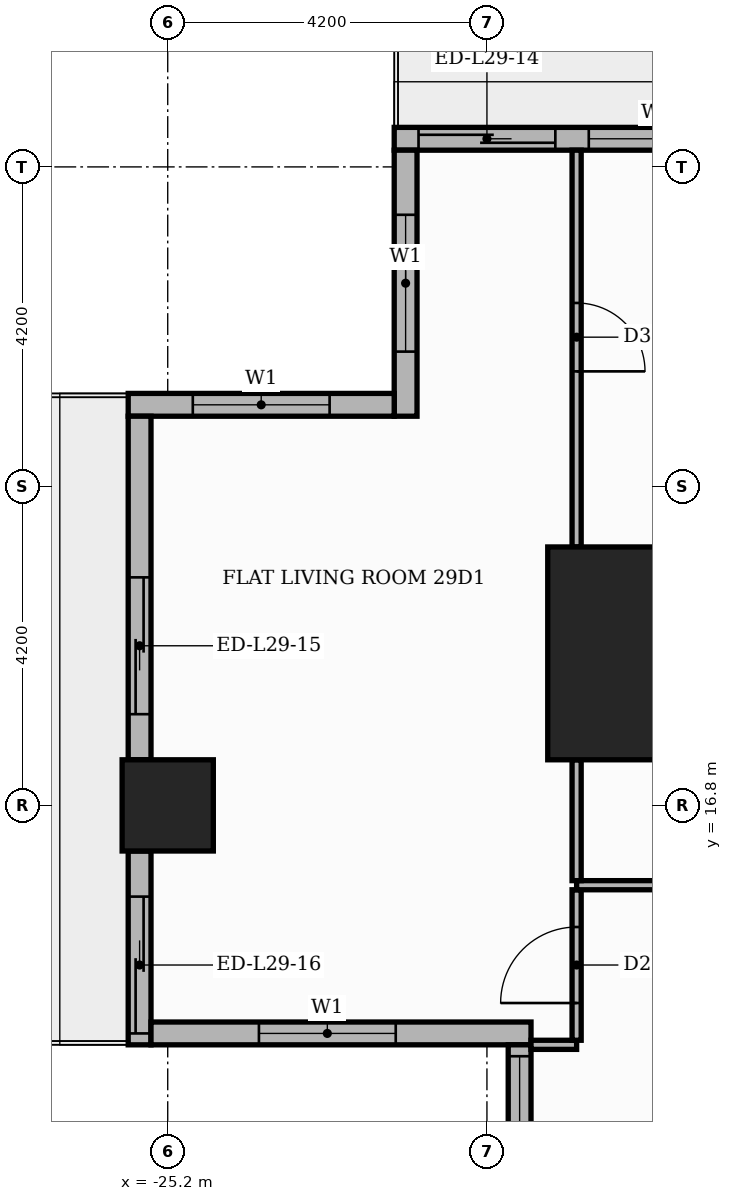
"""IFC4 building model, lengths in metres.
Left out: names, types, materials, properties, quantities, classifications, styles, units other than length and angle.
Written with IfcOpenShell. Run it as: python <this file> out.ifc"""

import sys

from ifc_helpers import new_model, si_unit, direction, frame, frame_2d, origin, origin_2d, place, context, subcontext, project, spatial, rectangle, extrude, element, fill, save


model = new_model("IFC4")
c1 = context("Model", 3, precision=1e-05, world=origin(), true_north=direction((0.0, 1.0)))
c2 = subcontext(c1, "Body", "Model", "MODEL_VIEW")
j1 = project(units=[si_unit("LENGTHUNIT", "METRE"), si_unit("PLANEANGLEUNIT", "RADIAN")], contexts=[c1])
p1 = place(None, origin())
s1 = spatial("IfcSite", under=j1, at=p1, CompositionType="ELEMENT")
p2 = place(p1, origin())
s2 = spatial("IfcBuilding", under=s1, at=p2, CompositionType="ELEMENT")
p3 = place(p2, frame((0.0, 0.0, 122.1)))
s3 = spatial("IfcBuildingStorey", under=s2, at=p3, CompositionType="ELEMENT", Elevation=122.1)
p4 = place(p3, frame((-18.8, 18.8, 0.0), z_axis=(0.0, 0.0, 1.0), x_axis=(1.0, 0.0, 0.0)))
e1 = element("IfcColumn", 1, at=p4, inside=s3, PredefinedType="COLUMN", context=c2, shape_type="SweptSolid", body=[
    extrude(rectangle(XDim=2.8, YDim=2.8, at=origin_2d()), origin(), (0.0, 0.0, 1.0), 3.9),
])
p5 = place(p3, frame((-25.2, 16.8, 0.0), z_axis=(0.0, 0.0, 1.0), x_axis=(1.0, 0.0, 0.0)))
e2 = element("IfcColumn", 2, at=p5, inside=s3, PredefinedType="COLUMN", context=c2, shape_type="SweptSolid", body=[
    extrude(rectangle(XDim=1.2, YDim=1.2, at=origin_2d()), origin(), (0.0, 0.0, 1.0), 3.9),
])
p6 = place(p3, frame((-17.4, 25.57, 0.0), z_axis=(0.0, 0.0, 1.0), x_axis=(-1.0, 0.0, 0.0)))
e3 = element("IfcWall", 3, at=p6, inside=s3, PredefinedType="STANDARD", context=c2, shape_type="SweptSolid", body=[
    extrude(rectangle(XDim=4.82, YDim=0.3, at=frame_2d((2.41, 0.0))), origin(), (0.0, 0.0, 1.0), 3.4),
])
p7 = place(p6, frame((2.7, 0.0, 0.0)))
e4 = element("IfcOpeningElement", 4, at=p7, cuts=e3, PredefinedType="OPENING", context=c2, shape_type="SweptSolid", body=[
    extrude(rectangle(XDim=1.8, YDim=2.4, at=frame_2d((0.9, 1.2))), frame((0.0, 0.16, 0.0), z_axis=(0.0, -1.0, 0.0), x_axis=(1.0, 0.0, 0.0)), (0.0, 0.0, 1.0), 0.32),
])
p8 = place(p6, frame((0.46, 0.0, 0.9)))
e5 = element("IfcOpeningElement", 5, at=p8, cuts=e3, PredefinedType="OPENING", context=c2, shape_type="SweptSolid", body=[
    extrude(rectangle(XDim=1.8, YDim=2.1, at=frame_2d((0.9, 1.05))), frame((0.0, 0.16, 0.0), z_axis=(0.0, -1.0, 0.0), x_axis=(1.0, 0.0, 0.0)), (0.0, 0.0, 1.0), 0.32),
])
p9 = place(p3, frame((-22.07, 25.42, 0.0), z_axis=(0.0, 0.0, 1.0), x_axis=(0.0, -1.0, 0.0)))
e6 = element("IfcWall", 6, at=p9, inside=s3, PredefinedType="STANDARD", context=c2, shape_type="SweptSolid", body=[
    extrude(rectangle(XDim=3.5, YDim=0.3, at=frame_2d((1.75, 0.0))), origin(), (0.0, 0.0, 1.0), 3.4),
])
p10 = place(p9, frame((0.85, 0.0, 0.9)))
e7 = element("IfcOpeningElement", 7, at=p10, cuts=e6, PredefinedType="OPENING", context=c2, shape_type="SweptSolid", body=[
    extrude(rectangle(XDim=1.8, YDim=2.1, at=frame_2d((0.9, 1.05))), frame((0.0, 0.16, 0.0), z_axis=(0.0, -1.0, 0.0), x_axis=(1.0, 0.0, 0.0)), (0.0, 0.0, 1.0), 0.32),
])
p11 = place(p3, frame((-22.22, 22.07, 0.0), z_axis=(0.0, 0.0, 1.0), x_axis=(-1.0, 0.0, 0.0)))
e8 = element("IfcWall", 8, at=p11, inside=s3, PredefinedType="STANDARD", context=c2, shape_type="SweptSolid", body=[
    extrude(rectangle(XDim=3.5, YDim=0.3, at=frame_2d((1.75, 0.0))), origin(), (0.0, 0.0, 1.0), 3.4),
])
p12 = place(p11, frame((0.85, 0.0, 0.9)))
e9 = element("IfcOpeningElement", 9, at=p12, cuts=e8, PredefinedType="OPENING", context=c2, shape_type="SweptSolid", body=[
    extrude(rectangle(XDim=1.8, YDim=2.1, at=frame_2d((0.9, 1.05))), frame((0.0, 0.16, 0.0), z_axis=(0.0, -1.0, 0.0), x_axis=(1.0, 0.0, 0.0)), (0.0, 0.0, 1.0), 0.32),
])
p13 = place(p3, frame((-25.57, 21.92, 0.0), z_axis=(0.0, 0.0, 1.0), x_axis=(0.0, -1.0, 0.0)))
e10 = element("IfcWall", 10, at=p13, inside=s3, PredefinedType="STANDARD", context=c2, shape_type="SweptSolid", body=[
    extrude(rectangle(XDim=4.52, YDim=0.3, at=frame_2d((2.26, 0.0))), origin(), (0.0, 0.0, 1.0), 3.4),
])
p14 = place(p13, frame((2.12, 0.0, 0.0)))
e11 = element("IfcOpeningElement", 11, at=p14, cuts=e10, PredefinedType="OPENING", context=c2, shape_type="SweptSolid", body=[
    extrude(rectangle(XDim=1.8, YDim=2.4, at=frame_2d((0.9, 1.2))), frame((0.0, 0.16, 0.0), z_axis=(0.0, -1.0, 0.0), x_axis=(1.0, 0.0, 0.0)), (0.0, 0.0, 1.0), 0.32),
])
p15 = place(p3, frame((-25.57, 16.2, 0.0), z_axis=(0.0, 0.0, 1.0), x_axis=(0.0, -1.0, 0.0)))
e12 = element("IfcWall", 12, at=p15, inside=s3, PredefinedType="STANDARD", context=c2, shape_type="SweptSolid", body=[
    extrude(rectangle(XDim=2.55, YDim=0.3, at=frame_2d((1.275, 0.0))), origin(), (0.0, 0.0, 1.0), 3.4),
])
p16 = place(p15, frame((0.6, 0.0, 0.0)))
e13 = element("IfcOpeningElement", 13, at=p16, cuts=e12, PredefinedType="OPENING", context=c2, shape_type="SweptSolid", body=[
    extrude(rectangle(XDim=1.8, YDim=2.4, at=frame_2d((0.9, 1.2))), frame((0.0, 0.16, 0.0), z_axis=(0.0, -1.0, 0.0), x_axis=(1.0, 0.0, 0.0)), (0.0, 0.0, 1.0), 0.32),
])
p17 = place(p3, frame((-25.42, 13.8, 0.0), z_axis=(0.0, 0.0, 1.0), x_axis=(1.0, 0.0, 0.0)))
e14 = element("IfcWall", 14, at=p17, inside=s3, PredefinedType="STANDARD", context=c2, shape_type="SweptSolid", body=[
    extrude(rectangle(XDim=5.0, YDim=0.3, at=frame_2d((2.5, 0.0))), origin(), (0.0, 0.0, 1.0), 3.4),
])
p18 = place(p17, frame((1.42, 0.0, 0.9)))
e15 = element("IfcOpeningElement", 15, at=p18, cuts=e14, PredefinedType="OPENING", context=c2, shape_type="SweptSolid", body=[
    extrude(rectangle(XDim=1.8, YDim=2.1, at=frame_2d((0.9, 1.05))), frame((0.0, 0.16, 0.0), z_axis=(0.0, -1.0, 0.0), x_axis=(1.0, 0.0, 0.0)), (0.0, 0.0, 1.0), 0.32),
])
p19 = place(p3, frame((-20.57, 13.65, 0.0), z_axis=(0.0, 0.0, 1.0), x_axis=(0.0, -1.0, 0.0)))
e16 = element("IfcWall", 16, at=p19, inside=s3, PredefinedType="STANDARD", context=c2, shape_type="SweptSolid", body=[
    extrude(rectangle(XDim=27.6, YDim=0.3, at=frame_2d((13.8, 0.0))), origin(), (0.0, 0.0, 1.0), 3.4),
])
p20 = place(p19, frame((0.15, 0.0, 0.9)))
e17 = element("IfcOpeningElement", 17, at=p20, cuts=e16, PredefinedType="OPENING", context=c2, shape_type="SweptSolid", body=[
    extrude(rectangle(XDim=6.0, YDim=2.1, at=frame_2d((3.0, 1.05))), frame((0.0, 0.16, 0.0), z_axis=(0.0, -1.0, 0.0), x_axis=(1.0, 0.0, 0.0)), (0.0, 0.0, 1.0), 0.32),
])
p21 = place(p19, frame((6.45, 0.0, 0.9)))
e18 = element("IfcOpeningElement", 18, at=p21, cuts=e16, PredefinedType="OPENING", context=c2, shape_type="SweptSolid", body=[
    extrude(rectangle(XDim=1.8, YDim=2.1, at=frame_2d((0.9, 1.05))), frame((0.0, 0.16, 0.0), z_axis=(0.0, -1.0, 0.0), x_axis=(1.0, 0.0, 0.0)), (0.0, 0.0, 1.0), 0.32),
])
p22 = place(p19, frame((8.55, 0.0, 0.9)))
e19 = element("IfcOpeningElement", 19, at=p22, cuts=e16, PredefinedType="OPENING", context=c2, shape_type="SweptSolid", body=[
    extrude(rectangle(XDim=6.0, YDim=2.1, at=frame_2d((3.0, 1.05))), frame((0.0, 0.16, 0.0), z_axis=(0.0, -1.0, 0.0), x_axis=(1.0, 0.0, 0.0)), (0.0, 0.0, 1.0), 0.32),
])
p23 = place(p19, frame((14.85, 0.0, 0.9)))
e20 = element("IfcOpeningElement", 20, at=p23, cuts=e16, PredefinedType="OPENING", context=c2, shape_type="SweptSolid", body=[
    extrude(rectangle(XDim=6.0, YDim=2.1, at=frame_2d((3.0, 1.05))), frame((0.0, 0.16, 0.0), z_axis=(0.0, -1.0, 0.0), x_axis=(1.0, 0.0, 0.0)), (0.0, 0.0, 1.0), 0.32),
])
p24 = place(p19, frame((21.15, 0.0, 0.9)))
e21 = element("IfcOpeningElement", 21, at=p24, cuts=e16, PredefinedType="OPENING", context=c2, shape_type="SweptSolid", body=[
    extrude(rectangle(XDim=6.0, YDim=2.1, at=frame_2d((3.0, 1.05))), frame((0.0, 0.16, 0.0), z_axis=(0.0, -1.0, 0.0), x_axis=(1.0, 0.0, 0.0)), (0.0, 0.0, 1.0), 0.32),
])
p25 = place(p3, frame((-20.42, 13.65, 0.0), z_axis=(0.0, 0.0, 1.0), x_axis=(1.0, 0.0, 0.0)))
e22 = element("IfcWall", 22, at=p25, inside=s3, PredefinedType="PARTITIONING", context=c2, shape_type="SweptSolid", body=[
    extrude(rectangle(XDim=0.6, YDim=0.12, at=frame_2d((0.3, 0.0))), origin(), (0.0, 0.0, 1.0), 3.4),
])
p26 = place(p3, frame((-19.82, 13.71, 0.0), z_axis=(0.0, 0.0, 1.0), x_axis=(0.0, 1.0, 0.0)))
e23 = element("IfcWall", 23, at=p26, inside=s3, PredefinedType="PARTITIONING", context=c2, shape_type="SweptSolid", body=[
    extrude(rectangle(XDim=1.98, YDim=0.12, at=frame_2d((0.99, 0.0))), origin(), (0.0, 0.0, 1.0), 3.4),
])
p27 = place(p26, frame((0.49, 0.0, 0.0)))
e24 = element("IfcOpeningElement", 24, at=p27, cuts=e23, PredefinedType="OPENING", context=c2, shape_type="SweptSolid", body=[
    extrude(rectangle(XDim=1.0, YDim=2.1, at=frame_2d((0.5, 1.05))), frame((0.0, 0.07, 0.0), z_axis=(0.0, -1.0, 0.0), x_axis=(1.0, 0.0, 0.0)), (0.0, 0.0, 1.0), 0.14),
])
p28 = place(p3, frame((-19.82, 15.75, 0.0), z_axis=(0.0, 0.0, 1.0), x_axis=(1.0, 0.0, 0.0)))
e25 = element("IfcWall", 25, at=p28, inside=s3, PredefinedType="PARTITIONING", context=c2, shape_type="SweptSolid", body=[
    extrude(rectangle(XDim=6.07, YDim=0.12, at=frame_2d((3.035, 0.0))), origin(), (0.0, 0.0, 1.0), 3.4),
])
p29 = place(p28, frame((2.585, 0.0, 0.0)))
e26 = element("IfcOpeningElement", 26, at=p29, cuts=e25, PredefinedType="OPENING", context=c2, shape_type="SweptSolid", body=[
    extrude(rectangle(XDim=1.0, YDim=2.1, at=frame_2d((0.5, 1.05))), frame((0.0, 0.07, 0.0), z_axis=(0.0, -1.0, 0.0), x_axis=(1.0, 0.0, 0.0)), (0.0, 0.0, 1.0), 0.14),
])
p30 = place(p3, frame((-19.82, 15.81, 0.0), z_axis=(0.0, 0.0, 1.0), x_axis=(0.0, 1.0, 0.0)))
e27 = element("IfcWall", 27, at=p30, inside=s3, PredefinedType="PARTITIONING", context=c2, shape_type="SweptSolid", body=[
    extrude(rectangle(XDim=1.59, YDim=0.12, at=frame_2d((0.795, 0.0))), origin(), (0.0, 0.0, 1.0), 3.4),
])
p31 = place(p3, frame((-19.82, 20.2, 0.0), z_axis=(0.0, 0.0, 1.0), x_axis=(0.0, 1.0, 0.0)))
e28 = element("IfcWall", 28, at=p31, inside=s3, PredefinedType="PARTITIONING", context=c2, shape_type="SweptSolid", body=[
    extrude(rectangle(XDim=5.22, YDim=0.12, at=frame_2d((2.61, 0.0))), origin(), (0.0, 0.0, 1.0), 3.4),
])
p32 = place(p31, frame((2.31, 0.0, 0.0)))
e29 = element("IfcOpeningElement", 29, at=p32, cuts=e28, PredefinedType="OPENING", context=c2, shape_type="SweptSolid", body=[
    extrude(rectangle(XDim=0.9, YDim=2.1, at=frame_2d((0.45, 1.05))), frame((0.0, 0.07, 0.0), z_axis=(0.0, -1.0, 0.0), x_axis=(1.0, 0.0, 0.0)), (0.0, 0.0, 1.0), 0.14),
])
p33 = place(p7, origin())
e30 = element("IfcDoor", 30, at=p33, inside=s3, OperationType="SLIDING_TO_LEFT", PredefinedType="DOOR", context=c2, shape_type="SweptSolid", body=[
    extrude(rectangle(XDim=1.8, YDim=2.4, at=frame_2d((0.9, 1.2))), frame((0.0, 0.025, 0.0), z_axis=(0.0, -1.0, 0.0), x_axis=(1.0, 0.0, 0.0)), (0.0, 0.0, 1.0), 0.05),
])
fill(e4, e30)
p34 = place(p8, origin())
e31 = element("IfcWindow", 31, at=p34, inside=s3, PartitioningType="SINGLE_PANEL", PredefinedType="WINDOW", context=c2, shape_type="SweptSolid", body=[
    extrude(rectangle(XDim=1.8, YDim=2.1, at=frame_2d((0.9, 1.05))), frame((0.0, 0.03, 0.0), z_axis=(0.0, -1.0, 0.0), x_axis=(1.0, 0.0, 0.0)), (0.0, 0.0, 1.0), 0.06),
])
fill(e5, e31)
p35 = place(p10, origin())
e32 = element("IfcWindow", 32, at=p35, inside=s3, PartitioningType="SINGLE_PANEL", PredefinedType="WINDOW", context=c2, shape_type="SweptSolid", body=[
    extrude(rectangle(XDim=1.8, YDim=2.1, at=frame_2d((0.9, 1.05))), frame((0.0, 0.03, 0.0), z_axis=(0.0, -1.0, 0.0), x_axis=(1.0, 0.0, 0.0)), (0.0, 0.0, 1.0), 0.06),
])
fill(e7, e32)
p36 = place(p12, origin())
e33 = element("IfcWindow", 33, at=p36, inside=s3, PartitioningType="SINGLE_PANEL", PredefinedType="WINDOW", context=c2, shape_type="SweptSolid", body=[
    extrude(rectangle(XDim=1.8, YDim=2.1, at=frame_2d((0.9, 1.05))), frame((0.0, 0.03, 0.0), z_axis=(0.0, -1.0, 0.0), x_axis=(1.0, 0.0, 0.0)), (0.0, 0.0, 1.0), 0.06),
])
fill(e9, e33)
p37 = place(p14, origin())
e34 = element("IfcDoor", 34, at=p37, inside=s3, OperationType="SLIDING_TO_RIGHT", PredefinedType="DOOR", context=c2, shape_type="SweptSolid", body=[
    extrude(rectangle(XDim=1.8, YDim=2.4, at=frame_2d((0.9, 1.2))), frame((0.0, 0.025, 0.0), z_axis=(0.0, -1.0, 0.0), x_axis=(1.0, 0.0, 0.0)), (0.0, 0.0, 1.0), 0.05),
])
fill(e11, e34)
p38 = place(p16, origin())
e35 = element("IfcDoor", 35, at=p38, inside=s3, OperationType="SLIDING_TO_LEFT", PredefinedType="DOOR", context=c2, shape_type="SweptSolid", body=[
    extrude(rectangle(XDim=1.8, YDim=2.4, at=frame_2d((0.9, 1.2))), frame((0.0, 0.025, 0.0), z_axis=(0.0, -1.0, 0.0), x_axis=(1.0, 0.0, 0.0)), (0.0, 0.0, 1.0), 0.05),
])
fill(e13, e35)
p39 = place(p18, origin())
e36 = element("IfcWindow", 36, at=p39, inside=s3, PartitioningType="SINGLE_PANEL", PredefinedType="WINDOW", context=c2, shape_type="SweptSolid", body=[
    extrude(rectangle(XDim=1.8, YDim=2.1, at=frame_2d((0.9, 1.05))), frame((0.0, 0.03, 0.0), z_axis=(0.0, -1.0, 0.0), x_axis=(1.0, 0.0, 0.0)), (0.0, 0.0, 1.0), 0.06),
])
fill(e15, e36)
p40 = place(p20, origin())
e37 = element("IfcWindow", 37, at=p40, inside=s3, PartitioningType="SINGLE_PANEL", PredefinedType="WINDOW", context=c2, shape_type="SweptSolid", body=[
    extrude(rectangle(XDim=6.0, YDim=2.1, at=frame_2d((3.0, 1.05))), frame((0.0, 0.03, 0.0), z_axis=(0.0, -1.0, 0.0), x_axis=(1.0, 0.0, 0.0)), (0.0, 0.0, 1.0), 0.06),
])
fill(e17, e37)
p41 = place(p32, frame((0.9, 0.0, 0.0), z_axis=(0.0, 0.0, 1.0), x_axis=(-1.0, 0.0, 0.0)))
e38 = element("IfcDoor", 38, at=p41, inside=s3, OperationType="SINGLE_SWING_LEFT", PredefinedType="DOOR", context=c2, shape_type="SweptSolid", body=[
    extrude(rectangle(XDim=0.9, YDim=2.1, at=frame_2d((0.45, 1.05))), frame((0.0, 0.025, 0.0), z_axis=(0.0, -1.0, 0.0), x_axis=(1.0, 0.0, 0.0)), (0.0, 0.0, 1.0), 0.05),
])
fill(e29, e38)
p42 = place(p27, origin())
e39 = element("IfcDoor", 39, at=p42, inside=s3, OperationType="SINGLE_SWING_LEFT", PredefinedType="DOOR", context=c2, shape_type="SweptSolid", body=[
    extrude(rectangle(XDim=1.0, YDim=2.1, at=frame_2d((0.5, 1.05))), frame((0.0, 0.025, 0.0), z_axis=(0.0, -1.0, 0.0), x_axis=(1.0, 0.0, 0.0)), (0.0, 0.0, 1.0), 0.05),
])
fill(e24, e39)
save(model, sys.argv[1])
